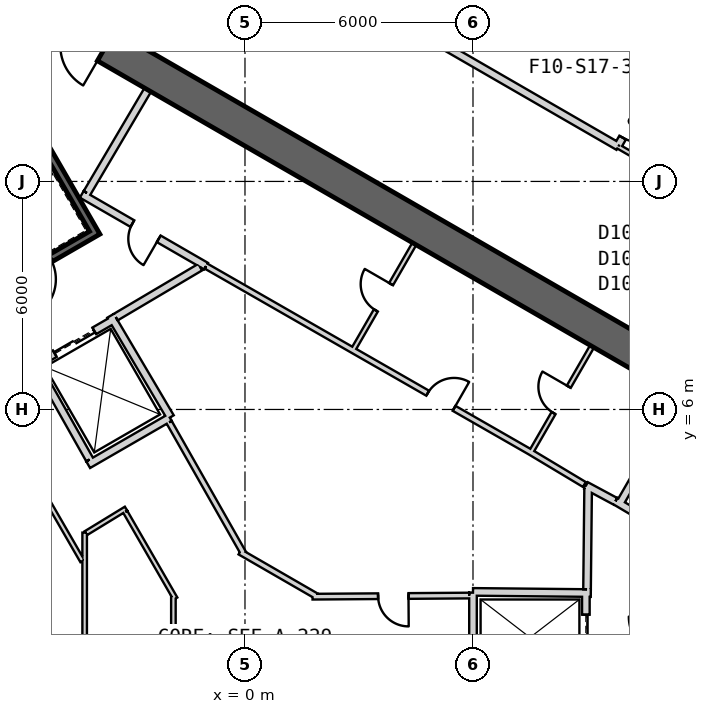
"""IFC4 building model, lengths in metres.
Left out: names, types, materials, properties, quantities, classifications, styles, units other than length and angle.
Written with IfcOpenShell. Run it as: python <this file> out.ifc"""

import sys

from ifc_helpers import new_model, si_unit, direction, frame, frame_2d, origin, place, context, subcontext, project, spatial, rectangle, extrude, element, fill, save


model = new_model("IFC4")
c1 = context("Model", 3, precision=1e-05, world=origin(), true_north=direction((0.0, 1.0)))
c2 = subcontext(c1, "Body", "Model", "MODEL_VIEW")
j1 = project(units=[si_unit("LENGTHUNIT", "METRE"), si_unit("PLANEANGLEUNIT", "RADIAN")], contexts=[c1])
p1 = place(None, origin())
s1 = spatial("IfcSite", under=j1, at=p1, CompositionType="ELEMENT")
p2 = place(p1, origin())
s2 = spatial("IfcBuilding", under=s1, at=p2, CompositionType="ELEMENT")
p3 = place(p2, frame((0.0, 0.0, 265.2)))
s3 = spatial("IfcBuildingStorey", under=s2, at=p3, CompositionType="ELEMENT", Elevation=265.2)
p4 = place(p3, frame((19.475, 2.208, 0.0), z_axis=(0.0, 0.0, 1.0), x_axis=(-0.866028369851, 0.499994862586, 0.0)))
e1 = element("IfcWall", 1, at=p4, inside=s3, PredefinedType="SHEAR", context=c2, shape_type="SweptSolid", body=[
    extrude(rectangle(XDim=31.523, YDim=0.9, at=frame_2d((15.762, 0.0))), origin(), (0.0, 0.0, 1.0), 4.0),
])
p5 = place(p4, frame((7.062, 0.0, 0.0)))
e2 = element("IfcOpeningElement", 2, at=p5, cuts=e1, PredefinedType="OPENING", context=c2, shape_type="SweptSolid", body=[
    extrude(rectangle(XDim=1.2, YDim=2.4, at=frame_2d((0.6, 1.2))), frame((0.0, 0.46, 0.0), z_axis=(0.0, -1.0, 0.0), x_axis=(1.0, 0.0, 0.0)), (0.0, 0.0, 1.0), 0.92),
])
p6 = place(p4, frame((3.612, 0.0, 0.0)))
e3 = element("IfcOpeningElement", 3, at=p6, cuts=e1, PredefinedType="OPENING", context=c2, shape_type="SweptSolid", body=[
    extrude(rectangle(XDim=1.2, YDim=2.4, at=frame_2d((0.6, 1.2))), frame((0.0, 0.46, 0.0), z_axis=(0.0, -1.0, 0.0), x_axis=(1.0, 0.0, 0.0)), (0.0, 0.0, 1.0), 0.92),
])
p7 = place(p4, frame((26.712, 0.0, 0.0)))
e4 = element("IfcOpeningElement", 4, at=p7, cuts=e1, PredefinedType="OPENING", context=c2, shape_type="SweptSolid", body=[
    extrude(rectangle(XDim=1.2, YDim=2.4, at=frame_2d((0.6, 1.2))), frame((0.0, 0.46, 0.0), z_axis=(0.0, -1.0, 0.0), x_axis=(1.0, 0.0, 0.0)), (0.0, 0.0, 1.0), 0.92),
])
p8 = place(p3, frame((9.847, 3.495, 0.0), z_axis=(0.0, 0.0, 1.0), x_axis=(0.499984717929, 0.866034226713, 0.0)))
e5 = element("IfcWall", 5, at=p8, inside=s3, PredefinedType="PLUMBINGWALL", context=c2, shape_type="SweptSolid", body=[
    extrude(rectangle(XDim=3.25, YDim=0.2, at=frame_2d((1.625, 0.0))), origin(), (0.0, 0.0, 1.0), 3.7),
])
p9 = place(p3, frame((12.073, 2.211, 0.0), z_axis=(0.0, 0.0, 1.0), x_axis=(-0.860414880418, 0.509594185166, 0.0)))
e6 = element("IfcWall", 6, at=p9, inside=s3, PredefinedType="PLUMBINGWALL", context=c2, shape_type="SweptSolid", body=[
    extrude(rectangle(XDim=2.7, YDim=0.2, at=frame_2d((1.35, 0.0))), origin(), (0.0, 0.0, 1.0), 3.7),
])
p10 = place(p3, frame((8.97, 1.2, 0.0), z_axis=(0.0, 0.0, 1.0), x_axis=(0.0, -1.0, 0.0)))
e7 = element("IfcWall", 7, at=p10, inside=s3, PredefinedType="PLUMBINGWALL", context=c2, shape_type="SweptSolid", body=[
    extrude(rectangle(XDim=2.4, YDim=0.2, at=frame_2d((1.2, 0.0))), origin(), (0.0, 0.0, 1.0), 3.7),
])
p11 = place(p10, frame((0.6, 0.0, 0.0)))
e8 = element("IfcOpeningElement", 8, at=p11, cuts=e7, PredefinedType="OPENING", context=c2, shape_type="SweptSolid", body=[
    extrude(rectangle(XDim=1.2, YDim=2.4, at=frame_2d((0.6, 1.2))), frame((0.0, 0.11, 0.0), z_axis=(0.0, -1.0, 0.0), x_axis=(1.0, 0.0, 0.0)), (0.0, 0.0, 1.0), 0.22),
])
p12 = place(p3, frame((6.0, 1.2, 0.0), z_axis=(0.0, 0.0, 1.0), x_axis=(0.999949988, -0.010001074852, 0.0)))
e9 = element("IfcWall", 9, at=p12, inside=s3, PredefinedType="PLUMBINGWALL", context=c2, shape_type="SweptSolid", body=[
    extrude(rectangle(XDim=3.1, YDim=0.2, at=frame_2d((1.55, 0.0))), origin(), (0.0, 0.0, 1.0), 3.7),
])
p13 = place(p3, frame((6.0, -1.1, 0.0), z_axis=(0.0, 0.0, 1.0), x_axis=(0.0, 1.0, 0.0)))
e10 = element("IfcWall", 10, at=p13, inside=s3, PredefinedType="PLUMBINGWALL", context=c2, shape_type="SweptSolid", body=[
    extrude(rectangle(XDim=2.28, YDim=0.2, at=frame_2d((1.14, 0.0))), origin(), (0.0, 0.0, 1.0), 3.7),
])
p14 = place(p3, frame((-7.854, 17.405, -0.3), z_axis=(0.0, 0.0, 1.0), x_axis=(0.499997992926, -0.866026562566, 0.0)))
e11 = element("IfcWall", 11, at=p14, inside=s3, PredefinedType="SHEAR", context=c2, shape_type="SweptSolid", body=[
    extrude(rectangle(XDim=7.9, YDim=0.2, at=frame_2d((3.95, 0.0))), origin(), (0.0, 0.0, 1.0), 4.0),
])
p15 = place(p3, frame((-7.159, 8.8, -0.3), z_axis=(0.0, 0.0, 1.0), x_axis=(0.866047807691, 0.499961193289, 0.0)))
e12 = element("IfcWall", 12, at=p15, inside=s3, PredefinedType="SHEAR", context=c2, shape_type="SweptSolid", body=[
    extrude(rectangle(XDim=3.6, YDim=0.2, at=frame_2d((1.8, 0.0))), origin(), (0.0, 0.0, 1.0), 4.0),
])
p16 = place(p15, frame((1.25, 0.0, 0.3)))
e13 = element("IfcOpeningElement", 13, at=p16, cuts=e12, PredefinedType="OPENING", context=c2, shape_type="SweptSolid", body=[
    extrude(rectangle(XDim=1.1, YDim=2.1, at=frame_2d((0.55, 1.05))), frame((0.0, 0.11, 0.0), z_axis=(0.0, -1.0, 0.0), x_axis=(1.0, 0.0, 0.0)), (0.0, 0.0, 1.0), 0.22),
])
p17 = place(p3, frame((-5.524, 7.168, 0.0), z_axis=(0.0, 0.0, 1.0), x_axis=(0.866024647952, 0.500001309137, 0.0)))
e14 = element("IfcWall", 14, at=p17, inside=s3, PredefinedType="PLUMBINGWALL", context=c2, shape_type="SweptSolid", body=[
    extrude(rectangle(XDim=2.4, YDim=0.2, at=frame_2d((1.2, 0.0))), origin(), (0.0, 0.0, 1.0), 3.7),
])
p18 = place(p17, frame((0.6, 0.0, 0.0)))
e15 = element("IfcOpeningElement", 15, at=p18, cuts=e14, PredefinedType="OPENING", context=c2, shape_type="SweptSolid", body=[
    extrude(rectangle(XDim=1.2, YDim=2.4, at=frame_2d((0.6, 1.2))), frame((0.0, 0.11, 0.0), z_axis=(0.0, -1.0, 0.0), x_axis=(1.0, 0.0, 0.0)), (0.0, 0.0, 1.0), 0.22),
])
p19 = place(p3, frame((-3.538, 8.465, 0.0), z_axis=(0.0, 0.0, 1.0), x_axis=(0.508647062354, -0.860975125052, 0.0)))
e16 = element("IfcWall", 16, at=p19, inside=s3, PredefinedType="PLUMBINGWALL", context=c2, shape_type="SweptSolid", body=[
    extrude(rectangle(XDim=3.1, YDim=0.2, at=frame_2d((1.55, 0.0))), origin(), (0.0, 0.0, 1.0), 3.7),
])
p20 = place(p3, frame((-1.979, 5.786, 0.0), z_axis=(0.0, 0.0, 1.0), x_axis=(-0.866016689309, -0.500015093611, 0.0)))
e17 = element("IfcWall", 17, at=p20, inside=s3, PredefinedType="PLUMBINGWALL", context=c2, shape_type="SweptSolid", body=[
    extrude(rectangle(XDim=2.479, YDim=0.2, at=frame_2d((1.24, 0.0))), origin(), (0.0, 0.0, 1.0), 3.7),
])
p21 = place(p3, frame((-5.562, 7.296, 0.0), z_axis=(0.0, 0.0, 1.0), x_axis=(0.49134651263, -0.870964180966, 0.0)))
e18 = element("IfcWall", 18, at=p21, inside=s3, PredefinedType="PLUMBINGWALL", context=c2, shape_type="SweptSolid", body=[
    extrude(rectangle(XDim=3.0, YDim=0.2, at=frame_2d((1.5, 0.0))), origin(), (0.0, 0.0, 1.0), 3.7),
])
p22 = place(p3, frame((7.508, 4.845, 0.0), z_axis=(0.0, 0.0, 1.0), x_axis=(0.500017246033, 0.866015446554, 0.0)))
e19 = element("IfcWall", 19, at=p22, inside=s3, PredefinedType="PARTITIONING", context=c2, shape_type="SweptSolid", body=[
    extrude(rectangle(XDim=3.25, YDim=0.12, at=frame_2d((1.625, 0.0))), origin(), (0.0, 0.0, 1.0), 3.7),
])
p23 = place(p22, frame((1.225, 0.0, 0.0)))
e20 = element("IfcOpeningElement", 20, at=p23, cuts=e19, PredefinedType="OPENING", context=c2, shape_type="SweptSolid", body=[
    extrude(rectangle(XDim=0.8, YDim=2.1, at=frame_2d((0.4, 1.05))), frame((0.0, 0.07, 0.0), z_axis=(0.0, -1.0, 0.0), x_axis=(1.0, 0.0, 0.0)), (0.0, 0.0, 1.0), 0.14),
])
p24 = place(p3, frame((8.974, 3.999, 0.0), z_axis=(0.0, 0.0, 1.0), x_axis=(0.880917147855, -0.473270513147, 0.0)))
e21 = element("IfcWall", 21, at=p24, inside=s3, PredefinedType="PARTITIONING", context=c2, shape_type="SweptSolid", body=[
    extrude(rectangle(XDim=0.878, YDim=0.2, at=frame_2d((0.439, 0.0))), origin(), (0.0, 0.0, 1.0), 3.7),
])
p25 = place(p3, frame((8.931, 4.026, 0.0), z_axis=(0.0, 0.0, 1.0), x_axis=(-0.857531586833, 0.514431314738, 0.0)))
e22 = element("IfcWall", 22, at=p25, inside=s3, PredefinedType="PLUMBINGWALL", context=c2, shape_type="SweptSolid", body=[
    extrude(rectangle(XDim=1.671, YDim=0.15, at=frame_2d((0.836, 0.0))), origin(), (0.0, 0.0, 1.0), 3.7),
])
p26 = place(p3, frame((2.832, 7.545, 0.0), z_axis=(0.0, 0.0, 1.0), x_axis=(0.500017246033, 0.866015446554, 0.0)))
e23 = element("IfcWall", 23, at=p26, inside=s3, PredefinedType="PARTITIONING", context=c2, shape_type="SweptSolid", body=[
    extrude(rectangle(XDim=3.25, YDim=0.12, at=frame_2d((1.625, 0.0))), origin(), (0.0, 0.0, 1.0), 3.7),
])
p27 = place(p26, frame((1.225, 0.0, 0.0)))
e24 = element("IfcOpeningElement", 24, at=p27, cuts=e23, PredefinedType="OPENING", context=c2, shape_type="SweptSolid", body=[
    extrude(rectangle(XDim=0.8, YDim=2.1, at=frame_2d((0.4, 1.05))), frame((0.0, 0.07, 0.0), z_axis=(0.0, -1.0, 0.0), x_axis=(1.0, 0.0, 0.0)), (0.0, 0.0, 1.0), 0.14),
])
p28 = place(p3, frame((7.497, 4.886, 0.0), z_axis=(0.0, 0.0, 1.0), x_axis=(-0.867541725638, 0.497364407931, 0.0)))
e25 = element("IfcWall", 25, at=p28, inside=s3, PredefinedType="PLUMBINGWALL", context=c2, shape_type="SweptSolid", body=[
    extrude(rectangle(XDim=9.822, YDim=0.15, at=frame_2d((4.911, 0.0))), origin(), (0.0, 0.0, 1.0), 3.7),
])
p29 = place(p28, frame((2.3, 0.0, 0.0)))
e26 = element("IfcOpeningElement", 26, at=p29, cuts=e25, PredefinedType="OPENING", context=c2, shape_type="SweptSolid", body=[
    extrude(rectangle(XDim=0.8, YDim=2.1, at=frame_2d((0.4, 1.05))), frame((0.0, 0.085, 0.0), z_axis=(0.0, -1.0, 0.0), x_axis=(1.0, 0.0, 0.0)), (0.0, 0.0, 1.0), 0.17),
])
p30 = place(p3, frame((-4.296, 11.66, 0.0), z_axis=(0.0, 0.0, 1.0), x_axis=(0.866027389382, -0.499996560828, 0.0)))
e27 = element("IfcWall", 27, at=p30, inside=s3, PredefinedType="PARTITIONING", context=c2, shape_type="SweptSolid", body=[
    extrude(rectangle(XDim=3.778, YDim=0.2, at=frame_2d((1.889, 0.0))), origin(), (0.0, 0.0, 1.0), 3.7),
])
p31 = place(p30, frame((1.539, 0.0, 0.0)))
e28 = element("IfcOpeningElement", 28, at=p31, cuts=e27, PredefinedType="OPENING", context=c2, shape_type="SweptSolid", body=[
    extrude(rectangle(XDim=0.8, YDim=2.1, at=frame_2d((0.4, 1.05))), frame((0.0, 0.11, 0.0), z_axis=(0.0, -1.0, 0.0), x_axis=(1.0, 0.0, 0.0)), (0.0, 0.0, 1.0), 0.22),
])
p32 = place(p3, frame((-2.558, 14.409, 0.0), z_axis=(0.0, 0.0, 1.0), x_axis=(-0.508018930956, -0.861345903683, 0.0)))
e29 = element("IfcWall", 29, at=p32, inside=s3, PredefinedType="PARTITIONING", context=c2, shape_type="SweptSolid", body=[
    extrude(rectangle(XDim=3.15, YDim=0.2, at=frame_2d((1.575, 0.0))), origin(), (0.0, 0.0, 1.0), 3.7),
])
p33 = place(p3, frame((9.001, 1.27, 0.0), z_axis=(0.0, 0.0, 1.0), x_axis=(0.010751103362, 0.999942205218, 0.0)))
e30 = element("IfcWall", 30, at=p33, inside=s3, PredefinedType="PARTITIONING", context=c2, shape_type="SweptSolid", body=[
    extrude(rectangle(XDim=2.725, YDim=0.2, at=frame_2d((1.363, 0.0))), origin(), (0.0, 0.0, 1.0), 3.7),
])
p34 = place(p3, frame((-1.179, 9.745, 0.0), z_axis=(0.0, 0.0, 1.0), x_axis=(-0.860630814782, -0.509229418482, 0.0)))
e31 = element("IfcWall", 31, at=p34, inside=s3, PredefinedType="PARTITIONING", context=c2, shape_type="SweptSolid", body=[
    extrude(rectangle(XDim=2.582, YDim=0.2, at=frame_2d((1.291, 0.0))), origin(), (0.0, 0.0, 1.0), 3.7),
])
p35 = place(p3, frame((1.778, 1.074, 0.0), z_axis=(0.0, 0.0, 1.0), x_axis=(0.999973898196, 0.007225159347, 0.0)))
e32 = element("IfcWall", 32, at=p35, inside=s3, PredefinedType="PLUMBINGWALL", context=c2, shape_type="SweptSolid", body=[
    extrude(rectangle(XDim=4.122, YDim=0.15, at=frame_2d((2.061, 0.0))), origin(), (0.0, 0.0, 1.0), 3.7),
])
p36 = place(p35, frame((1.725, 0.0, 0.0)))
e33 = element("IfcOpeningElement", 33, at=p36, cuts=e32, PredefinedType="OPENING", context=c2, shape_type="SweptSolid", body=[
    extrude(rectangle(XDim=0.8, YDim=2.1, at=frame_2d((0.4, 1.05))), frame((0.0, 0.085, 0.0), z_axis=(0.0, -1.0, 0.0), x_axis=(1.0, 0.0, 0.0)), (0.0, 0.0, 1.0), 0.17),
])
p37 = place(p3, frame((-0.132, 2.251, 0.0), z_axis=(0.0, 0.0, 1.0), x_axis=(0.866028486751, -0.499994660107, 0.0)))
e34 = element("IfcWall", 34, at=p37, inside=s3, PredefinedType="PLUMBINGWALL", context=c2, shape_type="SweptSolid", body=[
    extrude(rectangle(XDim=2.329, YDim=0.15, at=frame_2d((1.165, 0.0))), origin(), (0.0, 0.0, 1.0), 3.7),
])
p38 = place(p3, frame((-1.994, 5.661, 0.0), z_axis=(0.0, 0.0, 1.0), x_axis=(0.493780191404, -0.869586753911, 0.0)))
e35 = element("IfcWall", 35, at=p38, inside=s3, PredefinedType="PLUMBINGWALL", context=c2, shape_type="SweptSolid", body=[
    extrude(rectangle(XDim=3.971, YDim=0.15, at=frame_2d((1.986, 0.0))), origin(), (0.0, 0.0, 1.0), 3.7),
])
p39 = place(p3, frame((-4.219, -2.76, 0.0), z_axis=(0.0, 0.0, 1.0), x_axis=(0.0, 1.0, 0.0)))
e36 = element("IfcWall", 36, at=p39, inside=s3, PredefinedType="PARTITIONING", context=c2, shape_type="SweptSolid", body=[
    extrude(rectangle(XDim=5.521, YDim=0.12, at=frame_2d((2.76, 0.0))), origin(), (0.0, 0.0, 1.0), 3.7),
])
p40 = place(p3, frame((-4.279, 2.011, 0.0), z_axis=(0.0, 0.0, 1.0), x_axis=(-0.500027278734, 0.866009653827, 0.0)))
e37 = element("IfcWall", 37, at=p40, inside=s3, PredefinedType="PARTITIONING", context=c2, shape_type="SweptSolid", body=[
    extrude(rectangle(XDim=3.559, YDim=0.12, at=frame_2d((1.779, 0.0))), origin(), (0.0, 0.0, 1.0), 3.7),
])
p41 = place(p3, frame((-3.13, 3.391, 0.0), z_axis=(0.0, 0.0, 1.0), x_axis=(-0.853228335638, -0.521537541567, 0.0)))
e38 = element("IfcWall", 38, at=p41, inside=s3, PredefinedType="PARTITIONING", context=c2, shape_type="SweptSolid", body=[
    extrude(rectangle(XDim=1.241, YDim=0.12, at=frame_2d((0.621, 0.0))), origin(), (0.0, 0.0, 1.0), 3.7),
])
p42 = place(p3, frame((-1.832, 1.022, 0.0), z_axis=(0.0, 0.0, 1.0), x_axis=(-0.500000102728, 0.866025344474, 0.0)))
e39 = element("IfcWall", 39, at=p42, inside=s3, PredefinedType="PARTITIONING", context=c2, shape_type="SweptSolid", body=[
    extrude(rectangle(XDim=2.639, YDim=0.12, at=frame_2d((1.319, 0.0))), origin(), (0.0, 0.0, 1.0), 3.7),
])
p43 = place(p3, frame((-1.884, -1.216, 0.0), z_axis=(0.0, 0.0, 1.0), x_axis=(0.0, 1.0, 0.0)))
e40 = element("IfcWall", 40, at=p43, inside=s3, PredefinedType="PARTITIONING", context=c2, shape_type="SweptSolid", body=[
    extrude(rectangle(XDim=2.31, YDim=0.12, at=frame_2d((1.155, 0.0))), origin(), (0.0, 0.0, 1.0), 3.7),
])
p44 = place(p3, frame((11.817, 11.768, 0.0), z_axis=(0.0, 0.0, 1.0), x_axis=(-0.86602648383, 0.499998129301, 0.0)))
e41 = element("IfcWall", 41, at=p44, inside=s3, PredefinedType="PARTITIONING", context=c2, shape_type="SweptSolid", body=[
    extrude(rectangle(XDim=2.3, YDim=0.12, at=frame_2d((1.15, 0.0))), origin(), (0.0, 0.0, 1.0), 3.7),
])
p45 = place(p44, frame((0.65, 0.0, 0.0)))
e42 = element("IfcOpeningElement", 42, at=p45, cuts=e41, PredefinedType="OPENING", context=c2, shape_type="SweptSolid", body=[
    extrude(rectangle(XDim=1.0, YDim=2.1, at=frame_2d((0.5, 1.05))), frame((0.0, 0.07, 0.0), z_axis=(0.0, -1.0, 0.0), x_axis=(1.0, 0.0, 0.0)), (0.0, 0.0, 1.0), 0.14),
])
p46 = place(p3, frame((9.825, 12.918, 0.0), z_axis=(0.0, 0.0, 1.0), x_axis=(-0.866022708987, 0.500004667497, 0.0)))
e43 = element("IfcWall", 43, at=p46, inside=s3, PredefinedType="PARTITIONING", context=c2, shape_type="SweptSolid", body=[
    extrude(rectangle(XDim=18.496, YDim=0.2, at=frame_2d((9.248, 0.0))), origin(), (0.0, 0.0, 1.0), 2.98),
])
p47 = place(p3, frame((13.817, 19.872, 0.0), z_axis=(0.0, 0.0, 1.0), x_axis=(-0.499989797406, -0.866031294175, 0.0)))
e44 = element("IfcWall", 44, at=p47, inside=s3, PredefinedType="PARTITIONING", context=c2, shape_type="SweptSolid", body=[
    extrude(rectangle(XDim=7.958, YDim=0.2, at=frame_2d((3.979, 0.0))), origin(), (0.0, 0.0, 1.0), 3.7),
])
p48 = place(p47, frame((6.758, 0.0, 0.0)))
e45 = element("IfcOpeningElement", 45, at=p48, cuts=e44, PredefinedType="OPENING", context=c2, shape_type="SweptSolid", body=[
    extrude(rectangle(XDim=1.0, YDim=2.1, at=frame_2d((0.5, 1.05))), frame((0.0, 0.11, 0.0), z_axis=(0.0, -1.0, 0.0), x_axis=(1.0, 0.0, 0.0)), (0.0, 0.0, 1.0), 0.22),
])
p49 = place(p11, origin())
e46 = element("IfcDoor", 46, at=p49, inside=s3, OperationType="SLIDING_TO_LEFT", PredefinedType="USERDEFINED", context=c2, shape_type="SweptSolid", body=[
    extrude(rectangle(XDim=1.2, YDim=2.4, at=frame_2d((0.6, 1.2))), frame((0.0, 0.025, 0.0), z_axis=(0.0, -1.0, 0.0), x_axis=(1.0, 0.0, 0.0)), (0.0, 0.0, 1.0), 0.05),
])
fill(e8, e46)
p50 = place(p18, origin())
e47 = element("IfcDoor", 47, at=p50, inside=s3, OperationType="SLIDING_TO_LEFT", PredefinedType="USERDEFINED", context=c2, shape_type="SweptSolid", body=[
    extrude(rectangle(XDim=1.2, YDim=2.4, at=frame_2d((0.6, 1.2))), frame((0.0, 0.025, 0.0), z_axis=(0.0, -1.0, 0.0), x_axis=(1.0, 0.0, 0.0)), (0.0, 0.0, 1.0), 0.05),
])
fill(e15, e47)
p51 = place(p36, origin())
e48 = element("IfcDoor", 48, at=p51, inside=s3, OperationType="SINGLE_SWING_LEFT", PredefinedType="USERDEFINED", context=c2, shape_type="SweptSolid", body=[
    extrude(rectangle(XDim=0.8, YDim=2.1, at=frame_2d((0.4, 1.05))), frame((0.0, 0.025, 0.0), z_axis=(0.0, -1.0, 0.0), x_axis=(1.0, 0.0, 0.0)), (0.0, 0.0, 1.0), 0.05),
])
fill(e33, e48)
p52 = place(p23, origin())
e49 = element("IfcDoor", 49, at=p52, inside=s3, OperationType="SINGLE_SWING_RIGHT", PredefinedType="USERDEFINED", context=c2, shape_type="SweptSolid", body=[
    extrude(rectangle(XDim=0.8, YDim=2.1, at=frame_2d((0.4, 1.05))), frame((0.0, 0.025, 0.0), z_axis=(0.0, -1.0, 0.0), x_axis=(1.0, 0.0, 0.0)), (0.0, 0.0, 1.0), 0.05),
])
fill(e20, e49)
p53 = place(p27, origin())
e50 = element("IfcDoor", 50, at=p53, inside=s3, OperationType="SINGLE_SWING_RIGHT", PredefinedType="USERDEFINED", context=c2, shape_type="SweptSolid", body=[
    extrude(rectangle(XDim=0.8, YDim=2.1, at=frame_2d((0.4, 1.05))), frame((0.0, 0.025, 0.0), z_axis=(0.0, -1.0, 0.0), x_axis=(1.0, 0.0, 0.0)), (0.0, 0.0, 1.0), 0.05),
])
fill(e24, e50)
p54 = place(p31, origin())
e51 = element("IfcDoor", 51, at=p54, inside=s3, OperationType="SINGLE_SWING_LEFT", PredefinedType="USERDEFINED", context=c2, shape_type="SweptSolid", body=[
    extrude(rectangle(XDim=0.8, YDim=2.1, at=frame_2d((0.4, 1.05))), frame((0.0, 0.025, 0.0), z_axis=(0.0, -1.0, 0.0), x_axis=(1.0, 0.0, 0.0)), (0.0, 0.0, 1.0), 0.05),
])
fill(e28, e51)
p55 = place(p29, origin())
e52 = element("IfcDoor", 52, at=p55, inside=s3, OperationType="SINGLE_SWING_LEFT", PredefinedType="USERDEFINED", context=c2, shape_type="SweptSolid", body=[
    extrude(rectangle(XDim=0.8, YDim=2.1, at=frame_2d((0.4, 1.05))), frame((0.0, 0.025, 0.0), z_axis=(0.0, -1.0, 0.0), x_axis=(1.0, 0.0, 0.0)), (0.0, 0.0, 1.0), 0.05),
])
fill(e26, e52)
p56 = place(p48, origin())
e53 = element("IfcDoor", 53, at=p56, inside=s3, OperationType="SINGLE_SWING_RIGHT", PredefinedType="USERDEFINED", context=c2, shape_type="SweptSolid", body=[
    extrude(rectangle(XDim=1.0, YDim=2.1, at=frame_2d((0.5, 1.05))), frame((0.0, 0.025, 0.0), z_axis=(0.0, -1.0, 0.0), x_axis=(1.0, 0.0, 0.0)), (0.0, 0.0, 1.0), 0.05),
])
fill(e45, e53)
save(model, sys.argv[1])
